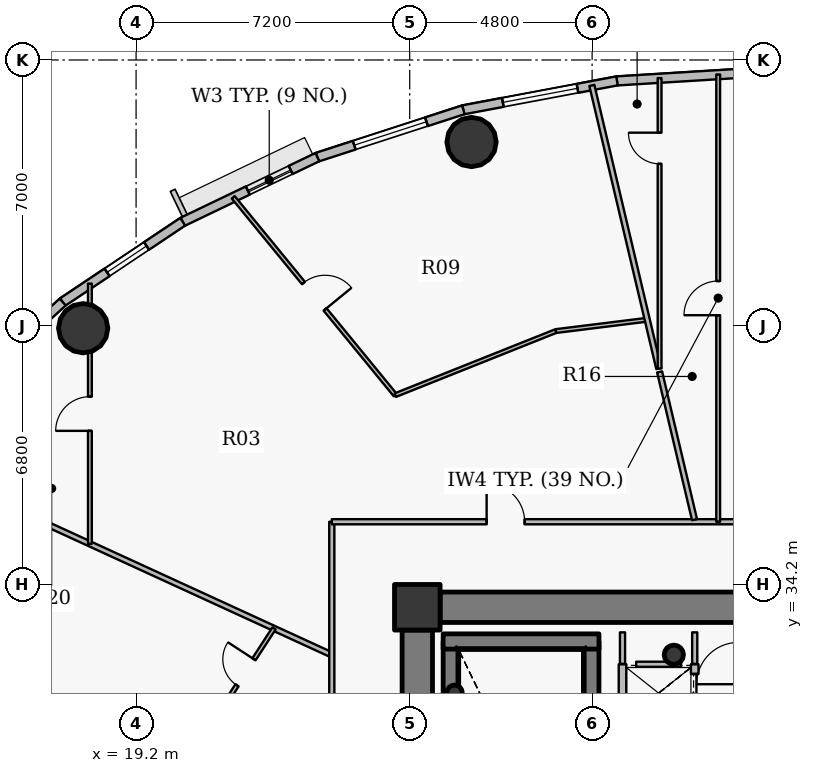
"""IFC4 building model, lengths in metres.
Left out: names, types, materials, properties, quantities, classifications, styles, units other than length and angle.
Written with IfcOpenShell. Run it as: python <this file> out.ifc"""

import sys

from ifc_helpers import new_model, si_unit, direction, frame, frame_2d, origin, origin_2d, place, context, subcontext, project, spatial, rectangle, hollow_circle, extrude, source, transform, mapped, element, fill, save


model = new_model("IFC4")
c1 = context("Model", 3, precision=1e-05, world=origin(), true_north=direction((0.0, 1.0)))
c2 = subcontext(c1, "Body", "Model", "MODEL_VIEW")
j1 = project(units=[si_unit("LENGTHUNIT", "METRE"), si_unit("PLANEANGLEUNIT", "RADIAN")], contexts=[c1])
p1 = place(None, origin())
s1 = spatial("IfcSite", under=j1, at=p1, CompositionType="ELEMENT")
p2 = place(p1, origin())
s2 = spatial("IfcBuilding", under=s1, at=p2, CompositionType="ELEMENT")
p3 = place(p2, frame((0.0, 0.0, 163.65)))
s3 = spatial("IfcBuildingStorey", under=s2, at=p3, CompositionType="ELEMENT", Elevation=163.65)
p4 = place(p3, frame((26.6, 33.6, 0.0), z_axis=(0.0, 0.0, 1.0), x_axis=(1.0, 0.0, 0.0)))
e1 = element("IfcColumn", 1, at=p4, inside=s3, PredefinedType="COLUMN", context=c2, shape_type="SweptSolid", body=[
    extrude(rectangle(XDim=1.2, YDim=1.2, at=origin_2d()), origin(), (0.0, 0.0, 1.0), 3.75),
])
p5 = place(p3, frame((33.35, 32.35, 0.0), z_axis=(0.0, 0.0, 1.0), x_axis=(1.0, 0.0, 0.0)))
e2 = element("IfcColumn", 2, at=p5, inside=s3, PredefinedType="COLUMN", context=c2, shape_type="SweptSolid", body=[
    extrude(hollow_circle(Radius=0.254, WallThickness=0.02, at=origin_2d()), origin(), (0.0, 0.0, 1.0), 3.75),
])
p6 = place(p3, frame((27.48, 24.1, 0.0), z_axis=(0.0, 0.0, 1.0), x_axis=(0.0, 1.0, 0.0)))
e3 = element("IfcWall", 3, at=p6, inside=s3, PredefinedType="SHEAR", context=c2, shape_type="SweptSolid", body=[
    extrude(rectangle(XDim=8.6, YDim=0.4, at=frame_2d((4.3, 0.0))), origin(), (0.0, 0.0, 1.0), 3.75),
])
p7 = place(p3, frame((31.18, 27.8, 0.0), z_axis=(0.0, 0.0, 1.0), x_axis=(0.0, 1.0, 0.0)))
e4 = element("IfcWall", 4, at=p7, inside=s3, PredefinedType="SHEAR", context=c2, shape_type="SweptSolid", body=[
    extrude(rectangle(XDim=4.9, YDim=0.4, at=frame_2d((2.45, 0.0))), origin(), (0.0, 0.0, 1.0), 3.75),
])
p8 = place(p3, frame((27.28, 32.7, 0.0), z_axis=(0.0, 0.0, 1.0), x_axis=(1.0, 0.0, 0.0)))
e5 = element("IfcWall", 5, at=p8, inside=s3, PredefinedType="SHEAR", context=c2, shape_type="SweptSolid", body=[
    extrude(rectangle(XDim=4.1, YDim=0.4, at=frame_2d((2.05, 0.0))), origin(), (0.0, 0.0, 1.0), 3.75),
])
p9 = place(p3, frame((27.58, 31.35, 0.0), z_axis=(0.0, 0.0, 1.0), x_axis=(1.0, 0.0, 0.0)))
e6 = element("IfcColumn", 6, at=p9, inside=s3, PredefinedType="COLUMN", context=c2, shape_type="SweptSolid", body=[
    extrude(hollow_circle(Radius=0.203, WallThickness=0.016, at=origin_2d()), origin(), (0.0, 0.0, 1.0), 3.75),
])
p10 = place(p3, frame((27.2, 33.6, 0.0), z_axis=(0.0, 0.0, 1.0), x_axis=(1.0, 0.0, 0.0)))
e7 = element("IfcWall", 7, at=p10, inside=s3, PredefinedType="SHEAR", context=c2, shape_type="SweptSolid", body=[
    extrude(rectangle(XDim=17.6, YDim=0.8, at=frame_2d((8.8, 0.0))), origin(), (0.0, 0.0, 1.0), 2.95),
])
p11 = place(p10, frame((13.45, 0.0, 0.0)))
e8 = element("IfcOpeningElement", 8, at=p11, cuts=e7, PredefinedType="OPENING", context=c2, shape_type="SweptSolid", body=[
    extrude(rectangle(XDim=1.15, YDim=2.15, at=origin_2d()), frame((0.575, 0.41, 1.075), z_axis=(0.0, -1.0, 0.0), x_axis=(1.0, 0.0, 0.0)), (0.0, 0.0, 1.0), 0.82),
])
p12 = place(p3, frame((26.6, 21.0, 0.0), z_axis=(0.0, 0.0, 1.0), x_axis=(0.0, 1.0, 0.0)))
e9 = element("IfcWall", 9, at=p12, inside=s3, PredefinedType="SHEAR", context=c2, shape_type="SweptSolid", body=[
    extrude(rectangle(XDim=12.0, YDim=0.8, at=frame_2d((6.0, 0.0))), origin(), (0.0, 0.0, 1.0), 2.95),
])
p13 = place(p12, frame((1.061, 0.0, 0.0)))
e10 = element("IfcOpeningElement", 10, at=p13, cuts=e9, PredefinedType="OPENING", context=c2, shape_type="SweptSolid", body=[
    extrude(rectangle(XDim=1.15, YDim=2.15, at=origin_2d()), frame((0.575, 0.41, 1.075), z_axis=(0.0, -1.0, 0.0), x_axis=(1.0, 0.0, 0.0)), (0.0, 0.0, 1.0), 0.82),
])
for number, where, z_axis, x_axis in (
    (11, (28.027, 45.841, 0.0), (0.0, 0.0, 1.0), (1.0, 0.0, 0.0)),
    (12, (17.808, 40.942, 0.0), (0.0, 0.0, 1.0), (1.0, 0.0, 0.0)),
):
    element("IfcColumn", number, at=place(p3, frame(where, z_axis=z_axis, x_axis=x_axis)), inside=s3, PredefinedType="COLUMN", context=c2, shape_type="SweptSolid", body=[
        extrude(hollow_circle(Radius=0.65, WallThickness=0.04, at=origin_2d()), origin(), (0.0, 0.0, 1.0), 3.75),
    ])
p14 = place(p3, frame((31.854, 47.449, 0.0), z_axis=(0.0, 0.0, 1.0), x_axis=(0.998104600619, 0.061540281305, 0.0)))
e13 = element("IfcWall", 13, at=p14, inside=s3, PredefinedType="SOLIDWALL", context=c2, shape_type="SweptSolid", body=[
    extrude(rectangle(XDim=4.154, YDim=0.24, at=frame_2d((2.077, 0.0))), origin(), (0.0, 0.0, 1.0), 3.5),
])
p15 = place(p3, frame((27.811, 46.689, 0.0), z_axis=(0.0, 0.0, 1.0), x_axis=(0.982788108205, 0.184736391573, 0.0)))
e14 = element("IfcWall", 14, at=p15, inside=s3, PredefinedType="SOLIDWALL", context=c2, shape_type="SweptSolid", body=[
    extrude(rectangle(XDim=4.114, YDim=0.24, at=frame_2d((2.057, 0.0))), origin(), (0.0, 0.0, 1.0), 3.5),
])
p16 = place(p15, frame((1.057, 0.0, 0.9)))
e15 = element("IfcOpeningElement", 15, at=p16, cuts=e14, PredefinedType="OPENING", context=c2, shape_type="SweptSolid", body=[
    extrude(rectangle(XDim=2.0, YDim=1.75, at=origin_2d()), frame((1.0, 0.13, 0.875), z_axis=(0.0, -1.0, 0.0), x_axis=(1.0, 0.0, 0.0)), (0.0, 0.0, 1.0), 0.26),
])
p17 = place(p3, frame((23.97, 45.444, 0.0), z_axis=(0.0, 0.0, 1.0), x_axis=(0.951209870236, 0.30854462038, 0.0)))
e16 = element("IfcWall", 16, at=p17, inside=s3, PredefinedType="SOLIDWALL", context=c2, shape_type="SweptSolid", body=[
    extrude(rectangle(XDim=4.038, YDim=0.24, at=frame_2d((2.019, 0.0))), origin(), (0.0, 0.0, 1.0), 3.5),
])
p18 = place(p17, frame((1.019, 0.0, 0.9)))
e17 = element("IfcOpeningElement", 17, at=p18, cuts=e16, PredefinedType="OPENING", context=c2, shape_type="SweptSolid", body=[
    extrude(rectangle(XDim=2.0, YDim=1.75, at=origin_2d()), frame((1.0, 0.13, 0.875), z_axis=(0.0, -1.0, 0.0), x_axis=(1.0, 0.0, 0.0)), (0.0, 0.0, 1.0), 0.26),
])
p19 = place(p3, frame((20.427, 43.743, 0.0), z_axis=(0.0, 0.0, 1.0), x_axis=(0.901564733809, 0.432644231155, 0.0)))
e18 = element("IfcWall", 18, at=p19, inside=s3, PredefinedType="SOLIDWALL", context=c2, shape_type="SweptSolid", body=[
    extrude(rectangle(XDim=3.93, YDim=0.24, at=frame_2d((1.965, 0.0))), origin(), (0.0, 0.0, 1.0), 3.5),
])
p20 = place(p19, frame((1.9, 0.0, 0.9)))
e19 = element("IfcOpeningElement", 19, at=p20, cuts=e18, PredefinedType="OPENING", context=c2, shape_type="SweptSolid", body=[
    extrude(rectangle(XDim=1.25, YDim=1.65, at=origin_2d()), frame((0.625, 0.13, 0.825), z_axis=(0.0, -1.0, 0.0), x_axis=(1.0, 0.0, 0.0)), (0.0, 0.0, 1.0), 0.26),
])
p21 = place(p3, frame((17.268, 41.631, 0.0), z_axis=(0.0, 0.0, 1.0), x_axis=(0.831228998277, 0.555930168657, 0.0)))
e20 = element("IfcWall", 20, at=p21, inside=s3, PredefinedType="SOLIDWALL", context=c2, shape_type="SweptSolid", body=[
    extrude(rectangle(XDim=3.8, YDim=0.24, at=frame_2d((1.9, 0.0))), origin(), (0.0, 0.0, 1.0), 3.5),
])
p22 = place(p21, frame((1.405, 0.0, 0.9)))
e21 = element("IfcOpeningElement", 21, at=p22, cuts=e20, PredefinedType="OPENING", context=c2, shape_type="SweptSolid", body=[
    extrude(rectangle(XDim=1.25, YDim=1.65, at=origin_2d()), frame((0.625, 0.13, 0.825), z_axis=(0.0, -1.0, 0.0), x_axis=(1.0, 0.0, 0.0)), (0.0, 0.0, 1.0), 0.26),
])
p23 = place(p3, frame((14.572, 39.158, 0.0), z_axis=(0.0, 0.0, 1.0), x_axis=(0.737076565834, 0.675809245349, 0.0)))
e22 = element("IfcWall", 22, at=p23, inside=s3, PredefinedType="SOLIDWALL", context=c2, shape_type="SweptSolid", body=[
    extrude(rectangle(XDim=3.658, YDim=0.24, at=frame_2d((1.829, 0.0))), origin(), (0.0, 0.0, 1.0), 3.5),
])
p24 = place(p3, frame((13.229, 37.45, 0.0), z_axis=(0.0, 0.0, 1.0), x_axis=(0.908867611309, -0.417084721746, 0.0)))
e23 = element("IfcWall", 23, at=p24, inside=s3, PredefinedType="PARTITIONING", context=c2, shape_type="SweptSolid", body=[
    extrude(rectangle(XDim=12.237, YDim=0.135, at=frame_2d((6.118, 0.0))), origin(), (0.0, 0.0, 1.0), 2.935),
])
p25 = place(p3, frame((17.984, 35.267, 0.0), z_axis=(0.0, 0.0, 1.0), x_axis=(0.0, 1.0, 0.0)))
e24 = element("IfcWall", 24, at=p25, inside=s3, PredefinedType="PARTITIONING", context=c2, shape_type="SweptSolid", body=[
    extrude(rectangle(XDim=6.848, YDim=0.1, at=frame_2d((3.424, 0.0))), origin(), (0.0, 0.0, 1.0), 2.935),
])
p26 = place(p25, frame((2.974, 0.0, 0.0)))
e25 = element("IfcOpeningElement", 25, at=p26, cuts=e24, PredefinedType="OPENING", context=c2, shape_type="SweptSolid", body=[
    extrude(rectangle(XDim=0.9, YDim=2.1, at=origin_2d()), frame((0.45, 0.06, 1.05), z_axis=(0.0, -1.0, 0.0), x_axis=(1.0, 0.0, 0.0)), (0.0, 0.0, 1.0), 0.12),
])
p27 = place(p3, frame((21.327, 30.733, 0.0), z_axis=(0.0, 0.0, 1.0), x_axis=(0.545365017792, 0.838198662233, 0.0)))
e26 = element("IfcWall", 26, at=p27, inside=s3, PredefinedType="PARTITIONING", context=c2, shape_type="SweptSolid", body=[
    extrude(rectangle(XDim=2.756, YDim=0.1, at=frame_2d((1.378, 0.0))), origin(), (0.0, 0.0, 1.0), 2.935),
])
p28 = place(p27, frame((0.968, 0.0, 0.0)))
e27 = element("IfcOpeningElement", 27, at=p28, cuts=e26, PredefinedType="OPENING", context=c2, shape_type="SweptSolid", body=[
    extrude(rectangle(XDim=0.82, YDim=2.1, at=origin_2d()), frame((0.41, 0.06, 1.05), z_axis=(0.0, -1.0, 0.0), x_axis=(1.0, 0.0, 0.0)), (0.0, 0.0, 1.0), 0.12),
])
p29 = place(p3, frame((21.756, 44.387, 0.0), z_axis=(0.0, 0.0, 1.0), x_axis=(0.633727642201, -0.773556252325, 0.0)))
e28 = element("IfcWall", 28, at=p29, inside=s3, PredefinedType="PARTITIONING", context=c2, shape_type="SweptSolid", body=[
    extrude(rectangle(XDim=6.729, YDim=0.1, at=frame_2d((3.365, 0.0))), origin(), (0.0, 0.0, 1.0), 2.935),
])
p30 = place(p29, frame((2.915, 0.0, 0.0)))
e29 = element("IfcOpeningElement", 29, at=p30, cuts=e28, PredefinedType="OPENING", context=c2, shape_type="SweptSolid", body=[
    extrude(rectangle(XDim=0.9, YDim=2.1, at=origin_2d()), frame((0.45, 0.06, 1.05), z_axis=(0.0, -1.0, 0.0), x_axis=(1.0, 0.0, 0.0)), (0.0, 0.0, 1.0), 0.12),
])
p31 = place(p3, frame((24.35, 27.95, 0.0), z_axis=(0.0, 0.0, 1.0), x_axis=(0.0, 1.0, 0.0)))
e30 = element("IfcWall", 30, at=p31, inside=s3, PredefinedType="PARTITIONING", context=c2, shape_type="SweptSolid", body=[
    extrude(rectangle(XDim=7.9, YDim=0.135, at=frame_2d((3.95, 0.0))), origin(), (0.0, 0.0, 1.0), 2.935),
])
p32 = place(p3, frame((24.35, 35.85, 0.0), z_axis=(0.0, 0.0, 1.0), x_axis=(1.0, 0.0, 0.0)))
e31 = element("IfcWall", 31, at=p32, inside=s3, PredefinedType="PARTITIONING", context=c2, shape_type="SweptSolid", body=[
    extrude(rectangle(XDim=29.104, YDim=0.135, at=frame_2d((14.552, 0.0))), origin(), (0.0, 0.0, 1.0), 2.935),
])
p33 = place(p32, frame((15.972, 0.0, 0.0)))
e32 = element("IfcOpeningElement", 32, at=p33, cuts=e31, PredefinedType="OPENING", context=c2, shape_type="SweptSolid", body=[
    extrude(rectangle(XDim=1.0, YDim=2.15, at=origin_2d()), frame((0.5, 0.078, 1.075), z_axis=(0.0, -1.0, 0.0), x_axis=(1.0, 0.0, 0.0)), (0.0, 0.0, 1.0), 0.155),
])
p34 = place(p32, frame((4.074, 0.0, 0.0)))
e33 = element("IfcOpeningElement", 33, at=p34, cuts=e31, PredefinedType="OPENING", context=c2, shape_type="SweptSolid", body=[
    extrude(rectangle(XDim=1.0, YDim=2.15, at=origin_2d()), frame((0.5, 0.078, 1.075), z_axis=(0.0, -1.0, 0.0), x_axis=(1.0, 0.0, 0.0)), (0.0, 0.0, 1.0), 0.155),
])
p35 = place(p3, frame((26.021, 39.181, 0.0), z_axis=(0.0, 0.0, 1.0), x_axis=(0.928787254853, 0.37061332305, 0.0)))
e34 = element("IfcWall", 34, at=p35, inside=s3, PredefinedType="PARTITIONING", context=c2, shape_type="SweptSolid", body=[
    extrude(rectangle(XDim=4.549, YDim=0.1, at=frame_2d((2.275, 0.0))), origin(), (0.0, 0.0, 1.0), 2.935),
])
p36 = place(p3, frame((30.246, 40.867, 0.0), z_axis=(0.0, 0.0, 1.0), x_axis=(0.99240598239, 0.123005553192, 0.0)))
e35 = element("IfcWall", 35, at=p36, inside=s3, PredefinedType="PARTITIONING", context=c2, shape_type="SweptSolid", body=[
    extrude(rectangle(XDim=2.423, YDim=0.1, at=frame_2d((1.212, 0.0))), origin(), (0.0, 0.0, 1.0), 2.935),
])
p37 = place(p3, frame((31.194, 47.33, 0.0), z_axis=(0.0, 0.0, 1.0), x_axis=(0.230064999041, -0.973175264902, 0.0)))
e36 = element("IfcWall", 36, at=p37, inside=s3, PredefinedType="PARTITIONING", context=c2, shape_type="SweptSolid", body=[
    extrude(rectangle(XDim=7.654, YDim=0.135, at=frame_2d((3.827, 0.0))), origin(), (0.0, 0.0, 1.0), 2.935),
])
p38 = place(p3, frame((32.0, 24.1, 0.0), z_axis=(0.0, 0.0, 1.0), x_axis=(0.0, 1.0, 0.0)))
e37 = element("IfcWall", 37, at=p38, inside=s3, PredefinedType="PARTITIONING", context=c2, shape_type="SweptSolid", body=[
    extrude(rectangle(XDim=8.0, YDim=0.2, at=frame_2d((4.0, 0.0))), origin(), (0.0, 0.0, 1.0), 3.5),
])
p39 = place(p3, frame((32.976, 39.792, 0.0), z_axis=(0.0, 0.0, 1.0), x_axis=(0.230050705958, -0.973178643769, 0.0)))
e38 = element("IfcWall", 38, at=p39, inside=s3, PredefinedType="PARTITIONING", context=c2, shape_type="SweptSolid", body=[
    extrude(rectangle(XDim=3.996, YDim=0.135, at=frame_2d((1.998, 0.0))), origin(), (0.0, 0.0, 1.0), 3.5),
])
p40 = place(p3, frame((32.976, 39.884, 0.0), z_axis=(0.0, 0.0, 1.0), x_axis=(0.0, 1.0, 0.0)))
e39 = element("IfcWall", 39, at=p40, inside=s3, PredefinedType="PARTITIONING", context=c2, shape_type="SweptSolid", body=[
    extrude(rectangle(XDim=7.64, YDim=0.1, at=frame_2d((3.82, 0.0))), origin(), (0.0, 0.0, 1.0), 2.935),
])
p41 = place(p40, frame((5.384, 0.0, 0.0)))
e40 = element("IfcOpeningElement", 40, at=p41, cuts=e39, PredefinedType="OPENING", context=c2, shape_type="SweptSolid", body=[
    extrude(rectangle(XDim=0.82, YDim=2.1, at=origin_2d()), frame((0.41, 0.06, 1.05), z_axis=(0.0, -1.0, 0.0), x_axis=(1.0, 0.0, 0.0)), (0.0, 0.0, 1.0), 0.12),
])
p42 = place(p3, frame((33.9, 20.8, 0.0), z_axis=(0.0, 0.0, 1.0), x_axis=(0.0, 1.0, 0.0)))
e41 = element("IfcWall", 41, at=p42, inside=s3, PredefinedType="PARTITIONING", context=c2, shape_type="SweptSolid", body=[
    extrude(rectangle(XDim=11.3, YDim=0.2, at=frame_2d((5.65, 0.0))), origin(), (0.0, 0.0, 1.0), 3.085),
])
p43 = place(p42, frame((6.98, 0.0, 0.0)))
e42 = element("IfcOpeningElement", 42, at=p43, cuts=e41, PredefinedType="OPENING", context=c2, shape_type="SweptSolid", body=[
    extrude(rectangle(XDim=1.05, YDim=2.15, at=origin_2d()), frame((0.525, 0.11, 1.075), z_axis=(0.0, -1.0, 0.0), x_axis=(1.0, 0.0, 0.0)), (0.0, 0.0, 1.0), 0.22),
])
p44 = place(p42, frame((8.495, 0.0, 0.0)))
e43 = element("IfcOpeningElement", 43, at=p44, cuts=e41, PredefinedType="OPENING", context=c2, shape_type="SweptSolid", body=[
    extrude(rectangle(XDim=1.05, YDim=2.15, at=origin_2d()), frame((0.525, 0.11, 1.075), z_axis=(0.0, -1.0, 0.0), x_axis=(1.0, 0.0, 0.0)), (0.0, 0.0, 1.0), 0.22),
])
p45 = place(p42, frame((9.995, 0.0, 0.0)))
e44 = element("IfcOpeningElement", 44, at=p45, cuts=e41, PredefinedType="OPENING", context=c2, shape_type="SweptSolid", body=[
    extrude(rectangle(XDim=1.05, YDim=2.15, at=origin_2d()), frame((0.525, 0.11, 1.075), z_axis=(0.0, -1.0, 0.0), x_axis=(1.0, 0.0, 0.0)), (0.0, 0.0, 1.0), 0.22),
])
p46 = place(p3, frame((34.518, 35.85, 0.0), z_axis=(0.0, 0.0, 1.0), x_axis=(0.0, 1.0, 0.0)))
e45 = element("IfcWall", 45, at=p46, inside=s3, PredefinedType="PARTITIONING", context=c2, shape_type="SweptSolid", body=[
    extrude(rectangle(XDim=11.769, YDim=0.1, at=frame_2d((5.884, 0.0))), origin(), (0.0, 0.0, 1.0), 2.935),
])
p47 = place(p46, frame((5.434, 0.0, 0.0)))
e46 = element("IfcOpeningElement", 46, at=p47, cuts=e45, PredefinedType="OPENING", context=c2, shape_type="SweptSolid", body=[
    extrude(rectangle(XDim=0.9, YDim=2.1, at=origin_2d()), frame((0.45, 0.06, 1.05), z_axis=(0.0, -1.0, 0.0), x_axis=(1.0, 0.0, 0.0)), (0.0, 0.0, 1.0), 0.12),
])
p48 = place(p3, frame((32.36, 32.1, 0.0), z_axis=(0.0, 0.0, 1.0), x_axis=(1.0, 0.0, 0.0)))
e47 = element("IfcWall", 47, at=p48, inside=s3, PredefinedType="PARTITIONING", context=c2, shape_type="SweptSolid", body=[
    extrude(rectangle(XDim=1.18, YDim=0.135, at=frame_2d((0.59, 0.0))), origin(), (0.0, 0.0, 1.0), 3.085),
])
p49 = place(p3, frame((32.0, 32.94, 0.0), z_axis=(0.0, 0.0, 1.0), x_axis=(0.0, -1.0, 0.0)))
e48 = element("IfcWall", 48, at=p49, inside=s3, PredefinedType="PARTITIONING", context=c2, shape_type="SweptSolid", body=[
    extrude(rectangle(XDim=0.83, YDim=0.135, at=frame_2d((0.415, 0.0))), origin(), (0.0, 0.0, 1.0), 3.035),
])
p50 = place(p3, frame((33.9, 32.11, 0.0), z_axis=(0.0, 0.0, 1.0), x_axis=(0.0, 1.0, 0.0)))
e49 = element("IfcWall", 49, at=p50, inside=s3, PredefinedType="PARTITIONING", context=c2, shape_type="SweptSolid", body=[
    extrude(rectangle(XDim=0.83, YDim=0.135, at=frame_2d((0.415, 0.0))), origin(), (0.0, 0.0, 1.0), 3.085),
])
p51 = place(p3, frame((27.19, 34.0, 0.0), z_axis=(0.0, 0.0, 1.0), x_axis=(-1.0, 0.0, 0.0)))
e50 = element("IfcWall", 50, at=p51, inside=s3, PredefinedType="PARTITIONING", context=c2, shape_type="SweptSolid", body=[
    extrude(rectangle(XDim=0.99, YDim=0.135, at=frame_2d((0.495, 0.0))), origin(), (0.0, 0.0, 1.0), 2.935),
])
p52 = place(p3, frame((26.2, 33.692, 0.0), z_axis=(0.0, 0.0, 1.0), x_axis=(0.0, -1.0, 0.0)))
e51 = element("IfcWall", 51, at=p52, inside=s3, PredefinedType="PARTITIONING", context=c2, shape_type="SweptSolid", body=[
    extrude(rectangle(XDim=0.682, YDim=0.135, at=frame_2d((0.341, 0.0))), origin(), (0.0, 0.0, 1.0), 3.5),
])
m1 = source(origin(), c2, "Body", "SweptSolid", [
    extrude(rectangle(XDim=2.0, YDim=1.75, at=origin_2d()), frame((1.0, 0.03, 0.875), z_axis=(0.0, -1.0, 0.0), x_axis=(1.0, 0.0, 0.0)), (0.0, 0.0, 1.0), 0.06),
])
p53 = place(p16, origin())
e52 = element("IfcWindow", 52, at=p53, inside=s3, PartitioningType="DOUBLE_PANEL_VERTICAL", PredefinedType="WINDOW", context=c2, shape_type="MappedRepresentation", body=[
    mapped(m1, transform((0.0, 0.0, 0.0), x_axis=(1.0, 0.0, 0.0), y_axis=(0.0, 1.0, 0.0), z_axis=(0.0, 0.0, 1.0), scale=1.0)),
])
fill(e15, e52)
p54 = place(p18, origin())
e53 = element("IfcWindow", 53, at=p54, inside=s3, PartitioningType="DOUBLE_PANEL_VERTICAL", PredefinedType="WINDOW", context=c2, shape_type="MappedRepresentation", body=[
    mapped(m1, transform((0.0, 0.0, 0.0), x_axis=(1.0, 0.0, 0.0), y_axis=(0.0, 1.0, 0.0), z_axis=(0.0, 0.0, 1.0), scale=1.0)),
])
fill(e17, e53)
m2 = source(origin(), c2, "Body", "SweptSolid", [
    extrude(rectangle(XDim=1.25, YDim=1.65, at=origin_2d()), frame((0.625, 0.03, 0.825), z_axis=(0.0, -1.0, 0.0), x_axis=(1.0, 0.0, 0.0)), (0.0, 0.0, 1.0), 0.06),
])
p55 = place(p20, origin())
e54 = element("IfcWindow", 54, at=p55, inside=s3, PartitioningType="SINGLE_PANEL", PredefinedType="WINDOW", context=c2, shape_type="MappedRepresentation", body=[
    mapped(m2, transform((0.0, 0.0, 0.0), x_axis=(1.0, 0.0, 0.0), y_axis=(0.0, 1.0, 0.0), z_axis=(0.0, 0.0, 1.0), scale=1.0)),
])
fill(e19, e54)
p56 = place(p22, origin())
e55 = element("IfcWindow", 55, at=p56, inside=s3, PartitioningType="SINGLE_PANEL", PredefinedType="WINDOW", context=c2, shape_type="MappedRepresentation", body=[
    mapped(m2, transform((0.0, 0.0, 0.0), x_axis=(1.0, 0.0, 0.0), y_axis=(0.0, 1.0, 0.0), z_axis=(0.0, 0.0, 1.0), scale=1.0)),
])
fill(e21, e55)
m3 = source(origin(), c2, "Body", "SweptSolid", [
    extrude(rectangle(XDim=1.05, YDim=2.15, at=origin_2d()), frame((0.525, 0.025, 1.075), z_axis=(0.0, -1.0, 0.0), x_axis=(1.0, 0.0, 0.0)), (0.0, 0.0, 1.0), 0.05),
])
p57 = place(p45, origin())
e56 = element("IfcDoor", 56, at=p57, inside=s3, OperationType="DOUBLE_DOOR_SLIDING", PredefinedType="USERDEFINED", context=c2, shape_type="MappedRepresentation", body=[
    mapped(m3, transform((0.0, 0.0, 0.0), x_axis=(1.0, 0.0, 0.0), y_axis=(0.0, 1.0, 0.0), z_axis=(0.0, 0.0, 1.0), scale=1.0)),
])
fill(e44, e56)
m4 = source(origin(), c2, "Body", "SweptSolid", [
    extrude(rectangle(XDim=0.9, YDim=2.1, at=origin_2d()), frame((0.45, 0.025, 1.05), z_axis=(0.0, -1.0, 0.0), x_axis=(1.0, 0.0, 0.0)), (0.0, 0.0, 1.0), 0.05),
])
p58 = place(p47, origin())
e57 = element("IfcDoor", 57, at=p58, inside=s3, OperationType="SINGLE_SWING_LEFT", PredefinedType="DOOR", context=c2, shape_type="MappedRepresentation", body=[
    mapped(m4, transform((0.0, 0.0, 0.0), x_axis=(1.0, 0.0, 0.0), y_axis=(0.0, 1.0, 0.0), z_axis=(0.0, 0.0, 1.0), scale=1.0)),
])
fill(e46, e57)
m5 = source(origin(), c2, "Body", "SweptSolid", [
    extrude(rectangle(XDim=0.82, YDim=2.1, at=origin_2d()), frame((0.41, 0.025, 1.05), z_axis=(0.0, -1.0, 0.0), x_axis=(1.0, 0.0, 0.0)), (0.0, 0.0, 1.0), 0.05),
])
p59 = place(p41, origin())
e58 = element("IfcDoor", 58, at=p59, inside=s3, OperationType="SINGLE_SWING_RIGHT", PredefinedType="DOOR", context=c2, shape_type="MappedRepresentation", body=[
    mapped(m5, transform((0.0, 0.0, 0.0), x_axis=(1.0, 0.0, 0.0), y_axis=(0.0, 1.0, 0.0), z_axis=(0.0, 0.0, 1.0), scale=1.0)),
])
fill(e40, e58)
m6 = source(origin(), c2, "Body", "SweptSolid", [
    extrude(rectangle(XDim=1.0, YDim=2.15, at=origin_2d()), frame((0.5, 0.025, 1.075), z_axis=(0.0, -1.0, 0.0), x_axis=(1.0, 0.0, 0.0)), (0.0, 0.0, 1.0), 0.05),
])
p60 = place(p34, origin())
e59 = element("IfcDoor", 59, at=p60, inside=s3, OperationType="SINGLE_SWING_LEFT", PredefinedType="DOOR", context=c2, shape_type="MappedRepresentation", body=[
    mapped(m6, transform((0.0, 0.0, 0.0), x_axis=(1.0, 0.0, 0.0), y_axis=(0.0, 1.0, 0.0), z_axis=(0.0, 0.0, 1.0), scale=1.0)),
])
fill(e33, e59)
p61 = place(p30, origin())
e60 = element("IfcDoor", 60, at=p61, inside=s3, OperationType="SINGLE_SWING_RIGHT", PredefinedType="DOOR", context=c2, shape_type="MappedRepresentation", body=[
    mapped(m4, transform((0.0, 0.0, 0.0), x_axis=(1.0, 0.0, 0.0), y_axis=(0.0, 1.0, 0.0), z_axis=(0.0, 0.0, 1.0), scale=1.0)),
])
fill(e29, e60)
p62 = place(p26, origin())
e61 = element("IfcDoor", 61, at=p62, inside=s3, OperationType="SINGLE_SWING_LEFT", PredefinedType="DOOR", context=c2, shape_type="MappedRepresentation", body=[
    mapped(m4, transform((0.0, 0.0, 0.0), x_axis=(1.0, 0.0, 0.0), y_axis=(0.0, 1.0, 0.0), z_axis=(0.0, 0.0, 1.0), scale=1.0)),
])
fill(e25, e61)
p63 = place(p28, origin())
e62 = element("IfcDoor", 62, at=p63, inside=s3, OperationType="SINGLE_SWING_RIGHT", PredefinedType="DOOR", context=c2, shape_type="MappedRepresentation", body=[
    mapped(m5, transform((0.0, 0.0, 0.0), x_axis=(1.0, 0.0, 0.0), y_axis=(0.0, 1.0, 0.0), z_axis=(0.0, 0.0, 1.0), scale=1.0)),
])
fill(e27, e62)
save(model, sys.argv[1])
